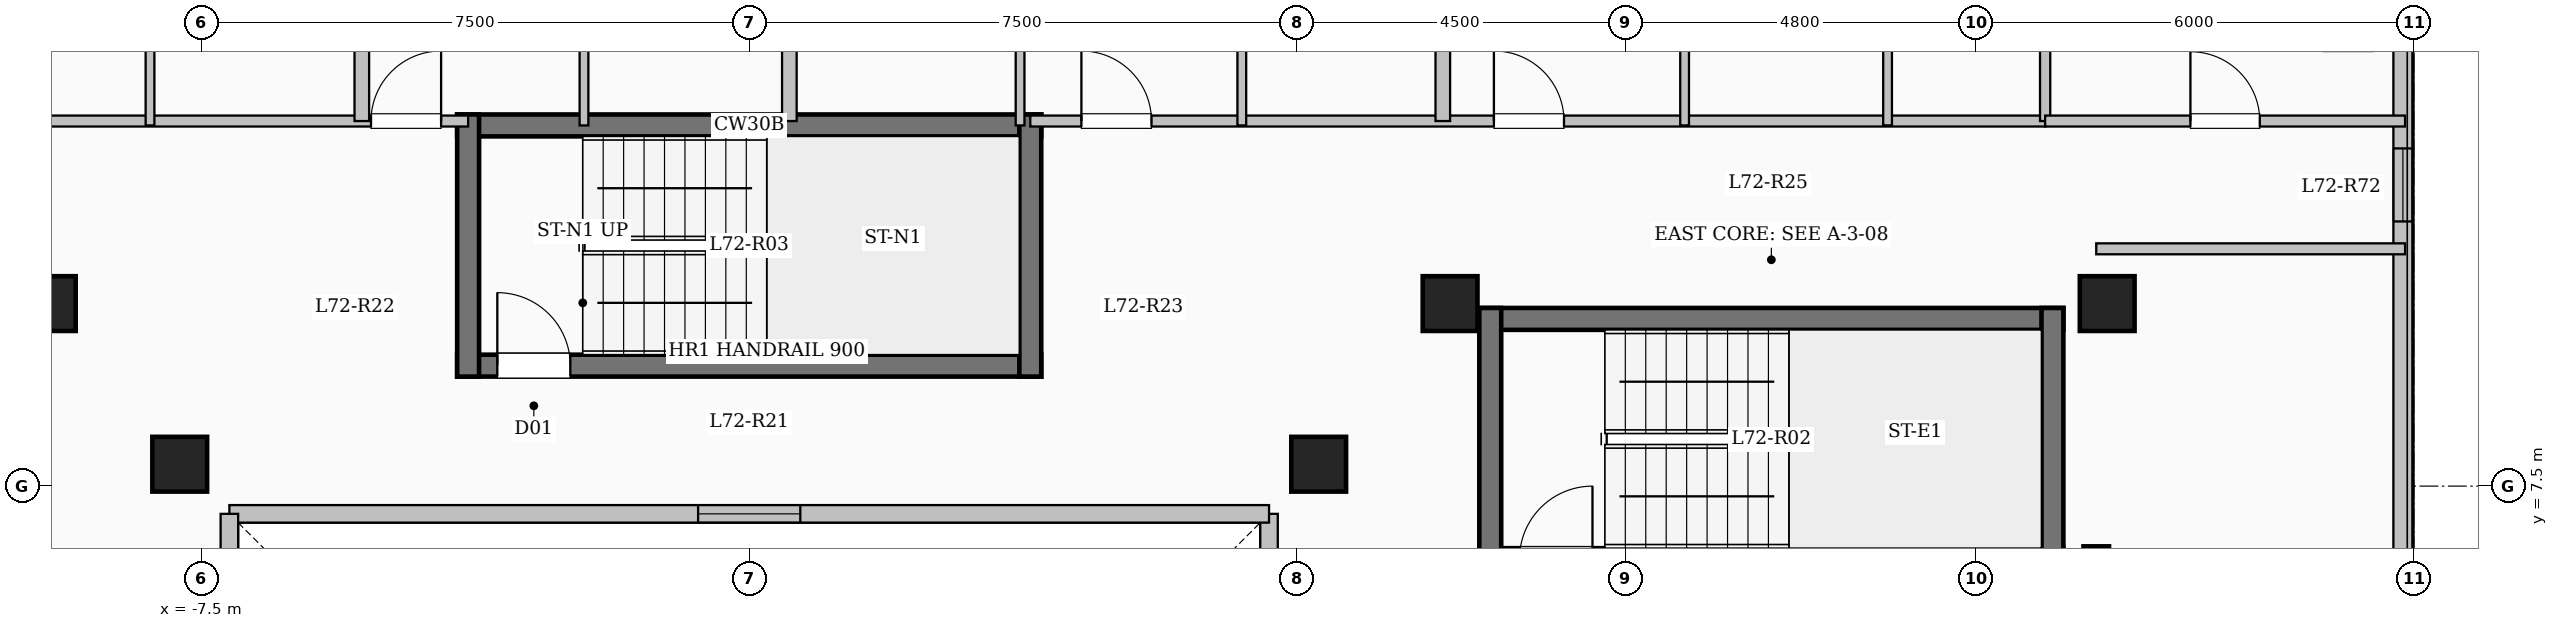
"""IFC4 building model, lengths in metres.
Left out: names, types, materials, properties, quantities, classifications, styles, units other than length and angle.
Written with IfcOpenShell. Run it as: python <this file> out.ifc"""

import sys

from ifc_helpers import new_model, si_unit, direction, frame, frame_2d, origin, origin_2d, place, context, subcontext, project, spatial, rectangle, extrude, element, fill, save


model = new_model("IFC4")
c1 = context("Model", 3, precision=1e-05, world=origin(), true_north=direction((0.0, 1.0)))
c2 = subcontext(c1, "Body", "Model", "MODEL_VIEW")
j1 = project(units=[si_unit("LENGTHUNIT", "METRE"), si_unit("PLANEANGLEUNIT", "RADIAN")], contexts=[c1])
p1 = place(None, origin())
s1 = spatial("IfcSite", under=j1, at=p1, CompositionType="ELEMENT")
p2 = place(p1, origin())
s2 = spatial("IfcBuilding", under=s1, at=p2, CompositionType="ELEMENT")
p3 = place(p2, frame((0.0, 0.0, 264.95)))
s3 = spatial("IfcBuildingStorey", under=s2, at=p3, CompositionType="ELEMENT", Elevation=264.95)
for number, where, z_axis, x_axis in (
    (1, (-7.8, 7.8, 0.0), (0.0, 0.0, 1.0), (1.0, 0.0, 0.0)),
    (2, (7.8, 7.8, 0.0), (0.0, 0.0, 1.0), (1.0, 0.0, 0.0)),
    (3, (-9.6, 10.0, 0.0), (0.0, 0.0, 1.0), (1.0, 0.0, 0.0)),
    (4, (9.6, 10.0, 0.0), (0.0, 0.0, 1.0), (1.0, 0.0, 0.0)),
    (5, (18.6, 10.0, 0.0), (0.0, 0.0, 1.0), (1.0, 0.0, 0.0)),
):
    element("IfcColumn", number, at=place(p3, frame(where, z_axis=z_axis, x_axis=x_axis)), inside=s3, PredefinedType="COLUMN", context=c2, shape_type="SweptSolid", body=[
        extrude(rectangle(XDim=0.75, YDim=0.75, at=origin_2d()), origin(), (0.0, 0.0, 1.0), 3.35),
    ])
p4 = place(p3, frame((7.12, -7.12, 0.0), z_axis=(0.0, 0.0, 1.0), x_axis=(0.0, 1.0, 0.0)))
e6 = element("IfcWall", 6, at=p4, inside=s3, PredefinedType="SOLIDWALL", context=c2, shape_type="SweptSolid", body=[
    extrude(rectangle(XDim=14.24, YDim=0.24, at=frame_2d((7.12, 0.0))), origin(), (0.0, 0.0, 1.0), 3.1),
])
p5 = place(p4, frame((6.42, 0.0, 0.95)))
e7 = element("IfcOpeningElement", 7, at=p5, cuts=e6, PredefinedType="OPENING", context=c2, shape_type="SweptSolid", body=[
    extrude(rectangle(XDim=1.4, YDim=1.5, at=frame_2d((0.7, 0.75))), frame((0.0, 0.13, 0.0), z_axis=(0.0, -1.0, 0.0), x_axis=(1.0, 0.0, 0.0)), (0.0, 0.0, 1.0), 0.26),
])
p6 = place(p3, frame((7.12, 7.12, 0.0), z_axis=(0.0, 0.0, 1.0), x_axis=(-1.0, 0.0, 0.0)))
e8 = element("IfcWall", 8, at=p6, inside=s3, PredefinedType="SOLIDWALL", context=c2, shape_type="SweptSolid", body=[
    extrude(rectangle(XDim=14.24, YDim=0.24, at=frame_2d((7.12, 0.0))), origin(), (0.0, 0.0, 1.0), 3.1),
])
p7 = place(p6, frame((6.42, 0.0, 0.95)))
e9 = element("IfcOpeningElement", 9, at=p7, cuts=e8, PredefinedType="OPENING", context=c2, shape_type="SweptSolid", body=[
    extrude(rectangle(XDim=1.4, YDim=1.5, at=frame_2d((0.7, 0.75))), frame((0.0, 0.13, 0.0), z_axis=(0.0, -1.0, 0.0), x_axis=(1.0, 0.0, 0.0)), (0.0, 0.0, 1.0), 0.26),
])
p8 = place(p3, frame((-7.12, 7.12, 0.0), z_axis=(0.0, 0.0, 1.0), x_axis=(0.0, -1.0, 0.0)))
e10 = element("IfcWall", 10, at=p8, inside=s3, PredefinedType="SOLIDWALL", context=c2, shape_type="SweptSolid", body=[
    extrude(rectangle(XDim=14.24, YDim=0.24, at=frame_2d((7.12, 0.0))), origin(), (0.0, 0.0, 1.0), 3.1),
])
p9 = place(p8, frame((6.42, 0.0, 0.95)))
e11 = element("IfcOpeningElement", 11, at=p9, cuts=e10, PredefinedType="OPENING", context=c2, shape_type="SweptSolid", body=[
    extrude(rectangle(XDim=1.4, YDim=1.5, at=frame_2d((0.7, 0.75))), frame((0.0, 0.13, 0.0), z_axis=(0.0, -1.0, 0.0), x_axis=(1.0, 0.0, 0.0)), (0.0, 0.0, 1.0), 0.26),
])
p10 = place(p3, frame((22.65, 17.55, 0.0), z_axis=(0.0, 0.0, 1.0), x_axis=(0.0, -1.0, 0.0)))
e12 = element("IfcWall", 12, at=p10, inside=s3, PredefinedType="SOLIDWALL", context=c2, shape_type="SweptSolid", body=[
    extrude(rectangle(XDim=35.1, YDim=0.26, at=frame_2d((17.55, 0.0))), origin(), (0.0, 0.0, 1.0), 3.1),
])
p11 = place(p10, frame((1.525, 0.0, 0.9)))
e13 = element("IfcOpeningElement", 13, at=p11, cuts=e12, PredefinedType="OPENING", context=c2, shape_type="SweptSolid", body=[
    extrude(rectangle(XDim=2.0, YDim=1.7, at=frame_2d((1.0, 0.85))), frame((0.0, 0.14, 0.0), z_axis=(0.0, -1.0, 0.0), x_axis=(1.0, 0.0, 0.0)), (0.0, 0.0, 1.0), 0.28),
])
p12 = place(p10, frame((5.425, 0.0, 0.95)))
e14 = element("IfcOpeningElement", 14, at=p12, cuts=e12, PredefinedType="OPENING", context=c2, shape_type="SweptSolid", body=[
    extrude(rectangle(XDim=1.0, YDim=1.5, at=frame_2d((0.5, 0.75))), frame((0.0, 0.14, 0.0), z_axis=(0.0, -1.0, 0.0), x_axis=(1.0, 0.0, 0.0)), (0.0, 0.0, 1.0), 0.28),
])
p13 = place(p10, frame((14.8, 0.0, 0.9)))
e15 = element("IfcOpeningElement", 15, at=p13, cuts=e12, PredefinedType="OPENING", context=c2, shape_type="SweptSolid", body=[
    extrude(rectangle(XDim=2.0, YDim=1.7, at=frame_2d((1.0, 0.85))), frame((0.0, 0.14, 0.0), z_axis=(0.0, -1.0, 0.0), x_axis=(1.0, 0.0, 0.0)), (0.0, 0.0, 1.0), 0.28),
])
p14 = place(p10, frame((25.275, 0.0, 0.95)))
e16 = element("IfcOpeningElement", 16, at=p14, cuts=e12, PredefinedType="OPENING", context=c2, shape_type="SweptSolid", body=[
    extrude(rectangle(XDim=1.2, YDim=1.5, at=frame_2d((0.6, 0.75))), frame((0.0, 0.14, 0.0), z_axis=(0.0, -1.0, 0.0), x_axis=(1.0, 0.0, 0.0)), (0.0, 0.0, 1.0), 0.28),
])
p15 = place(p10, frame((29.925, 0.0, 0.9)))
e17 = element("IfcOpeningElement", 17, at=p15, cuts=e12, PredefinedType="OPENING", context=c2, shape_type="SweptSolid", body=[
    extrude(rectangle(XDim=2.2, YDim=1.75, at=frame_2d((1.1, 0.875))), frame((0.0, 0.14, 0.0), z_axis=(0.0, -1.0, 0.0), x_axis=(1.0, 0.0, 0.0)), (0.0, 0.0, 1.0), 0.28),
])
p16 = place(p3, frame((10.0, 9.79, 0.0), z_axis=(0.0, 0.0, 1.0), x_axis=(1.0, 0.0, 0.0)))
e18 = element("IfcWall", 18, at=p16, inside=s3, PredefinedType="SHEAR", context=c2, shape_type="SweptSolid", body=[
    extrude(rectangle(XDim=8.0, YDim=0.3, at=frame_2d((4.0, 0.0))), origin(), (0.0, 0.0, 1.0), 3.35),
])
p17 = place(p3, frame((10.0, 6.5, 0.0), z_axis=(0.0, 0.0, 1.0), x_axis=(1.0, 0.0, 0.0)))
e19 = element("IfcWall", 19, at=p17, inside=s3, PredefinedType="SHEAR", context=c2, shape_type="SweptSolid", body=[
    extrude(rectangle(XDim=8.0, YDim=0.3, at=frame_2d((4.0, 0.0))), origin(), (0.0, 0.0, 1.0), 3.35),
])
p18 = place(p17, frame((0.55, 0.0, 0.0)))
e20 = element("IfcOpeningElement", 20, at=p18, cuts=e19, PredefinedType="OPENING", context=c2, shape_type="SweptSolid", body=[
    extrude(rectangle(XDim=1.0, YDim=2.15, at=frame_2d((0.5, 1.075))), frame((0.0, 0.16, 0.0), z_axis=(0.0, -1.0, 0.0), x_axis=(1.0, 0.0, 0.0)), (0.0, 0.0, 1.0), 0.32),
])
for number, where, z_axis, x_axis in (
    (21, (10.15, 6.35, 0.0), (0.0, 0.0, 1.0), (0.0, 1.0, 0.0)),
    (22, (17.85, 6.35, 0.0), (0.0, 0.0, 1.0), (0.0, 1.0, 0.0)),
):
    element("IfcWall", number, at=place(p3, frame(where, z_axis=z_axis, x_axis=x_axis)), inside=s3, PredefinedType="SHEAR", context=c2, shape_type="SweptSolid", body=[
        extrude(rectangle(XDim=3.59, YDim=0.3, at=frame_2d((1.795, 0.0))), origin(), (0.0, 0.0, 1.0), 3.35),
    ])
p19 = place(p3, frame((-4.0, 12.44, 0.0), z_axis=(0.0, 0.0, 1.0), x_axis=(1.0, 0.0, 0.0)))
e23 = element("IfcWall", 23, at=p19, inside=s3, PredefinedType="SHEAR", context=c2, shape_type="SweptSolid", body=[
    extrude(rectangle(XDim=8.0, YDim=0.3, at=frame_2d((4.0, 0.0))), origin(), (0.0, 0.0, 1.0), 3.35),
])
p20 = place(p3, frame((-4.0, 9.15, 0.0), z_axis=(0.0, 0.0, 1.0), x_axis=(1.0, 0.0, 0.0)))
e24 = element("IfcWall", 24, at=p20, inside=s3, PredefinedType="SHEAR", context=c2, shape_type="SweptSolid", body=[
    extrude(rectangle(XDim=8.0, YDim=0.3, at=frame_2d((4.0, 0.0))), origin(), (0.0, 0.0, 1.0), 3.35),
])
p21 = place(p20, frame((0.55, 0.0, 0.0)))
e25 = element("IfcOpeningElement", 25, at=p21, cuts=e24, PredefinedType="OPENING", context=c2, shape_type="SweptSolid", body=[
    extrude(rectangle(XDim=1.0, YDim=2.15, at=frame_2d((0.5, 1.075))), frame((0.0, 0.16, 0.0), z_axis=(0.0, -1.0, 0.0), x_axis=(1.0, 0.0, 0.0)), (0.0, 0.0, 1.0), 0.32),
])
for number, where, z_axis, x_axis in (
    (26, (-3.85, 9.0, 0.0), (0.0, 0.0, 1.0), (0.0, 1.0, 0.0)),
    (27, (3.85, 9.0, 0.0), (0.0, 0.0, 1.0), (0.0, 1.0, 0.0)),
):
    element("IfcWall", number, at=place(p3, frame(where, z_axis=z_axis, x_axis=x_axis)), inside=s3, PredefinedType="SHEAR", context=c2, shape_type="SweptSolid", body=[
        extrude(rectangle(XDim=3.59, YDim=0.3, at=frame_2d((1.795, 0.0))), origin(), (0.0, 0.0, 1.0), 3.35),
    ])
p22 = place(p3, frame((18.45, -7.375, 0.0), z_axis=(0.0, 0.0, 1.0), x_axis=(0.0, 1.0, 0.0)))
e28 = element("IfcWall", 28, at=p22, inside=s3, PredefinedType="SHEAR", context=c2, shape_type="SweptSolid", body=[
    extrude(rectangle(XDim=14.05, YDim=0.35, at=frame_2d((7.025, 0.0))), origin(), (0.0, 0.0, 1.0), 3.35),
])
p23 = place(p3, frame((-17.75, 12.5, 0.0), z_axis=(0.0, 0.0, 1.0), x_axis=(1.0, 0.0, 0.0)))
e29 = element("IfcWall", 29, at=p23, inside=s3, PredefinedType="PARTITIONING", context=c2, shape_type="SweptSolid", body=[
    extrude(rectangle(XDim=13.9, YDim=0.15, at=frame_2d((6.95, 0.0))), origin(), (0.0, 0.0, 1.0), 3.1),
])
p24 = place(p23, frame((0.7, 0.0, 0.0)))
e30 = element("IfcOpeningElement", 30, at=p24, cuts=e29, PredefinedType="OPENING", context=c2, shape_type="SweptSolid", body=[
    extrude(rectangle(XDim=0.96, YDim=2.15, at=frame_2d((0.48, 1.075))), frame((0.0, 0.085, 0.0), z_axis=(0.0, -1.0, 0.0), x_axis=(1.0, 0.0, 0.0)), (0.0, 0.0, 1.0), 0.17),
])
p25 = place(p23, frame((7.105, 0.0, 0.0)))
e31 = element("IfcOpeningElement", 31, at=p25, cuts=e29, PredefinedType="OPENING", context=c2, shape_type="SweptSolid", body=[
    extrude(rectangle(XDim=0.96, YDim=2.15, at=frame_2d((0.48, 1.075))), frame((0.0, 0.085, 0.0), z_axis=(0.0, -1.0, 0.0), x_axis=(1.0, 0.0, 0.0)), (0.0, 0.0, 1.0), 0.17),
])
p26 = place(p23, frame((12.57, 0.0, 0.0)))
e32 = element("IfcOpeningElement", 32, at=p26, cuts=e29, PredefinedType="OPENING", context=c2, shape_type="SweptSolid", body=[
    extrude(rectangle(XDim=0.96, YDim=2.15, at=frame_2d((0.48, 1.075))), frame((0.0, 0.085, 0.0), z_axis=(0.0, -1.0, 0.0), x_axis=(1.0, 0.0, 0.0)), (0.0, 0.0, 1.0), 0.17),
])
p27 = place(p3, frame((3.85, 12.5, 0.0), z_axis=(0.0, 0.0, 1.0), x_axis=(1.0, 0.0, 0.0)))
e33 = element("IfcWall", 33, at=p27, inside=s3, PredefinedType="PARTITIONING", context=c2, shape_type="SweptSolid", body=[
    extrude(rectangle(XDim=13.9, YDim=0.15, at=frame_2d((6.95, 0.0))), origin(), (0.0, 0.0, 1.0), 3.1),
])
p28 = place(p27, frame((0.7, 0.0, 0.0)))
e34 = element("IfcOpeningElement", 34, at=p28, cuts=e33, PredefinedType="OPENING", context=c2, shape_type="SweptSolid", body=[
    extrude(rectangle(XDim=0.96, YDim=2.15, at=frame_2d((0.48, 1.075))), frame((0.0, 0.085, 0.0), z_axis=(0.0, -1.0, 0.0), x_axis=(1.0, 0.0, 0.0)), (0.0, 0.0, 1.0), 0.17),
])
p29 = place(p27, frame((6.35, 0.0, 0.0)))
e35 = element("IfcOpeningElement", 35, at=p29, cuts=e33, PredefinedType="OPENING", context=c2, shape_type="SweptSolid", body=[
    extrude(rectangle(XDim=0.96, YDim=2.15, at=frame_2d((0.48, 1.075))), frame((0.0, 0.085, 0.0), z_axis=(0.0, -1.0, 0.0), x_axis=(1.0, 0.0, 0.0)), (0.0, 0.0, 1.0), 0.17),
])
p30 = place(p3, frame((0.55, 12.5, 0.0), z_axis=(0.0, 0.0, 1.0), x_axis=(0.0, 1.0, 0.0)))
e36 = element("IfcWall", 36, at=p30, inside=s3, PredefinedType="SOLIDWALL", context=c2, shape_type="SweptSolid", body=[
    extrude(rectangle(XDim=9.88, YDim=0.2, at=frame_2d((4.94, 0.0))), origin(), (0.0, 0.0, 1.0), 3.1),
])
p31 = place(p3, frame((-5.306, 12.5, 0.0), z_axis=(0.0, 0.0, 1.0), x_axis=(0.0, 1.0, 0.0)))
e37 = element("IfcWall", 37, at=p31, inside=s3, PredefinedType="SOLIDWALL", context=c2, shape_type="SweptSolid", body=[
    extrude(rectangle(XDim=9.805, YDim=0.2, at=frame_2d((4.902, 0.0))), origin(), (0.0, 0.0, 1.0), 3.1),
])
p32 = place(p3, frame((-8.207, 12.44, 0.0), z_axis=(0.0, 0.0, 1.0), x_axis=(0.0, 1.0, 0.0)))
e38 = element("IfcWall", 38, at=p32, inside=s3, PredefinedType="PARTITIONING", context=c2, shape_type="SweptSolid", body=[
    extrude(rectangle(XDim=3.21, YDim=0.12, at=frame_2d((1.605, 0.0))), origin(), (0.0, 0.0, 1.0), 3.1),
])
p33 = place(p32, frame((1.195, 0.0, 0.0)))
e39 = element("IfcOpeningElement", 39, at=p33, cuts=e38, PredefinedType="OPENING", context=c2, shape_type="SweptSolid", body=[
    extrude(rectangle(XDim=0.88, YDim=2.1, at=frame_2d((0.44, 1.05))), frame((0.0, 0.07, 0.0), z_axis=(0.0, -1.0, 0.0), x_axis=(1.0, 0.0, 0.0)), (0.0, 0.0, 1.0), 0.14),
])
p34 = place(p3, frame((-2.263, 12.44, 0.0), z_axis=(0.0, 0.0, 1.0), x_axis=(0.0, 1.0, 0.0)))
e40 = element("IfcWall", 40, at=p34, inside=s3, PredefinedType="PARTITIONING", context=c2, shape_type="SweptSolid", body=[
    extrude(rectangle(XDim=3.21, YDim=0.12, at=frame_2d((1.605, 0.0))), origin(), (0.0, 0.0, 1.0), 3.1),
])
p35 = place(p34, frame((1.195, 0.0, 0.0)))
e41 = element("IfcOpeningElement", 41, at=p35, cuts=e40, PredefinedType="OPENING", context=c2, shape_type="SweptSolid", body=[
    extrude(rectangle(XDim=0.88, YDim=2.1, at=frame_2d((0.44, 1.05))), frame((0.0, 0.07, 0.0), z_axis=(0.0, -1.0, 0.0), x_axis=(1.0, 0.0, 0.0)), (0.0, 0.0, 1.0), 0.14),
])
p36 = place(p3, frame((9.5, 12.5, 0.0), z_axis=(0.0, 0.0, 1.0), x_axis=(0.0, 1.0, 0.0)))
e42 = element("IfcWall", 42, at=p36, inside=s3, PredefinedType="SOLIDWALL", context=c2, shape_type="SweptSolid", body=[
    extrude(rectangle(XDim=8.77, YDim=0.2, at=frame_2d((4.385, 0.0))), origin(), (0.0, 0.0, 1.0), 3.1),
])
p37 = place(p3, frame((3.71, 12.44, 0.0), z_axis=(0.0, 0.0, 1.0), x_axis=(0.0, 1.0, 0.0)))
e43 = element("IfcWall", 43, at=p37, inside=s3, PredefinedType="PARTITIONING", context=c2, shape_type="SweptSolid", body=[
    extrude(rectangle(XDim=9.94, YDim=0.12, at=frame_2d((4.97, 0.0))), origin(), (0.0, 0.0, 1.0), 3.1),
])
p38 = place(p37, frame((2.735, 0.0, 0.0)))
e44 = element("IfcOpeningElement", 44, at=p38, cuts=e43, PredefinedType="OPENING", context=c2, shape_type="SweptSolid", body=[
    extrude(rectangle(XDim=1.08, YDim=2.15, at=frame_2d((0.54, 1.075))), frame((0.0, 0.07, 0.0), z_axis=(0.0, -1.0, 0.0), x_axis=(1.0, 0.0, 0.0)), (0.0, 0.0, 1.0), 0.14),
])
p39 = place(p3, frame((6.747, 12.44, 0.0), z_axis=(0.0, 0.0, 1.0), x_axis=(0.0, 1.0, 0.0)))
e45 = element("IfcWall", 45, at=p39, inside=s3, PredefinedType="PARTITIONING", context=c2, shape_type="SweptSolid", body=[
    extrude(rectangle(XDim=2.45, YDim=0.12, at=frame_2d((1.225, 0.0))), origin(), (0.0, 0.0, 1.0), 3.1),
])
p40 = place(p3, frame((12.812, 12.44, 0.0), z_axis=(0.0, 0.0, 1.0), x_axis=(0.0, 1.0, 0.0)))
e46 = element("IfcWall", 46, at=p40, inside=s3, PredefinedType="PARTITIONING", context=c2, shape_type="SweptSolid", body=[
    extrude(rectangle(XDim=8.46, YDim=0.12, at=frame_2d((4.23, 0.0))), origin(), (0.0, 0.0, 1.0), 3.1),
])
p41 = place(p40, frame((2.905, 0.0, 0.0)))
e47 = element("IfcOpeningElement", 47, at=p41, cuts=e46, PredefinedType="OPENING", context=c2, shape_type="SweptSolid", body=[
    extrude(rectangle(XDim=1.08, YDim=2.15, at=frame_2d((0.54, 1.075))), frame((0.0, 0.07, 0.0), z_axis=(0.0, -1.0, 0.0), x_axis=(1.0, 0.0, 0.0)), (0.0, 0.0, 1.0), 0.14),
])
p42 = place(p3, frame((15.592, 12.44, 0.0), z_axis=(0.0, 0.0, 1.0), x_axis=(0.0, 1.0, 0.0)))
e48 = element("IfcWall", 48, at=p42, inside=s3, PredefinedType="PARTITIONING", context=c2, shape_type="SweptSolid", body=[
    extrude(rectangle(XDim=2.62, YDim=0.12, at=frame_2d((1.31, 0.0))), origin(), (0.0, 0.0, 1.0), 3.1),
])
p43 = place(p3, frame((18.45, 10.75, 0.0), z_axis=(0.0, 0.0, 1.0), x_axis=(1.0, 0.0, 0.0)))
e49 = element("IfcWall", 49, at=p43, inside=s3, PredefinedType="PARTITIONING", context=c2, shape_type="SweptSolid", body=[
    extrude(rectangle(XDim=4.23, YDim=0.15, at=frame_2d((2.115, 0.0))), origin(), (0.0, 0.0, 1.0), 3.1),
])
p44 = place(p3, frame((17.75, 12.5, 0.0), z_axis=(0.0, 0.0, 1.0), x_axis=(0.0, 1.0, 0.0)))
e50 = element("IfcWall", 50, at=p44, inside=s3, PredefinedType="PARTITIONING", context=c2, shape_type="SweptSolid", body=[
    extrude(rectangle(XDim=5.05, YDim=0.14, at=frame_2d((2.525, 0.0))), origin(), (0.0, 0.0, 1.0), 3.1),
])
p45 = place(p3, frame((17.75, 12.5, 0.0), z_axis=(0.0, 0.0, 1.0), x_axis=(1.0, 0.0, 0.0)))
e51 = element("IfcWall", 51, at=p45, inside=s3, PredefinedType="PARTITIONING", context=c2, shape_type="SweptSolid", body=[
    extrude(rectangle(XDim=4.93, YDim=0.15, at=frame_2d((2.465, 0.0))), origin(), (0.0, 0.0, 1.0), 3.1),
])
p46 = place(p45, frame((1.99, 0.0, 0.0)))
e52 = element("IfcOpeningElement", 52, at=p46, cuts=e51, PredefinedType="OPENING", context=c2, shape_type="SweptSolid", body=[
    extrude(rectangle(XDim=0.95, YDim=2.15, at=frame_2d((0.475, 1.075))), frame((0.0, 0.085, 0.0), z_axis=(0.0, -1.0, 0.0), x_axis=(1.0, 0.0, 0.0)), (0.0, 0.0, 1.0), 0.17),
])
p47 = place(p7, origin())
e53 = element("IfcWindow", 53, at=p47, inside=s3, PartitioningType="SINGLE_PANEL", PredefinedType="WINDOW", context=c2, shape_type="SweptSolid", body=[
    extrude(rectangle(XDim=1.4, YDim=1.5, at=frame_2d((0.7, 0.75))), frame((0.0, 0.03, 0.0), z_axis=(0.0, -1.0, 0.0), x_axis=(1.0, 0.0, 0.0)), (0.0, 0.0, 1.0), 0.06),
])
fill(e9, e53)
p48 = place(p12, origin())
e54 = element("IfcWindow", 54, at=p48, inside=s3, PartitioningType="SINGLE_PANEL", PredefinedType="WINDOW", context=c2, shape_type="SweptSolid", body=[
    extrude(rectangle(XDim=1.0, YDim=1.5, at=frame_2d((0.5, 0.75))), frame((0.0, 0.03, 0.0), z_axis=(0.0, -1.0, 0.0), x_axis=(1.0, 0.0, 0.0)), (0.0, 0.0, 1.0), 0.06),
])
fill(e14, e54)
p49 = place(p21, origin())
e55 = element("IfcDoor", 55, at=p49, inside=s3, OperationType="SINGLE_SWING_LEFT", PredefinedType="DOOR", context=c2, shape_type="SweptSolid", body=[
    extrude(rectangle(XDim=1.0, YDim=2.15, at=frame_2d((0.5, 1.075))), frame((0.0, 0.025, 0.0), z_axis=(0.0, -1.0, 0.0), x_axis=(1.0, 0.0, 0.0)), (0.0, 0.0, 1.0), 0.05),
])
fill(e25, e55)
p50 = place(p26, origin())
e56 = element("IfcDoor", 56, at=p50, inside=s3, OperationType="SINGLE_SWING_RIGHT", PredefinedType="DOOR", context=c2, shape_type="SweptSolid", body=[
    extrude(rectangle(XDim=0.96, YDim=2.15, at=frame_2d((0.48, 1.075))), frame((0.0, 0.025, 0.0), z_axis=(0.0, -1.0, 0.0), x_axis=(1.0, 0.0, 0.0)), (0.0, 0.0, 1.0), 0.05),
])
fill(e32, e56)
p51 = place(p28, origin())
e57 = element("IfcDoor", 57, at=p51, inside=s3, OperationType="SINGLE_SWING_LEFT", PredefinedType="DOOR", context=c2, shape_type="SweptSolid", body=[
    extrude(rectangle(XDim=0.96, YDim=2.15, at=frame_2d((0.48, 1.075))), frame((0.0, 0.025, 0.0), z_axis=(0.0, -1.0, 0.0), x_axis=(1.0, 0.0, 0.0)), (0.0, 0.0, 1.0), 0.05),
])
fill(e34, e57)
p52 = place(p29, origin())
e58 = element("IfcDoor", 58, at=p52, inside=s3, OperationType="SINGLE_SWING_LEFT", PredefinedType="DOOR", context=c2, shape_type="SweptSolid", body=[
    extrude(rectangle(XDim=0.96, YDim=2.15, at=frame_2d((0.48, 1.075))), frame((0.0, 0.025, 0.0), z_axis=(0.0, -1.0, 0.0), x_axis=(1.0, 0.0, 0.0)), (0.0, 0.0, 1.0), 0.05),
])
fill(e35, e58)
p53 = place(p46, origin())
e59 = element("IfcDoor", 59, at=p53, inside=s3, OperationType="SINGLE_SWING_LEFT", PredefinedType="DOOR", context=c2, shape_type="SweptSolid", body=[
    extrude(rectangle(XDim=0.95, YDim=2.15, at=frame_2d((0.475, 1.075))), frame((0.0, 0.025, 0.0), z_axis=(0.0, -1.0, 0.0), x_axis=(1.0, 0.0, 0.0)), (0.0, 0.0, 1.0), 0.05),
])
fill(e52, e59)
save(model, sys.argv[1])
